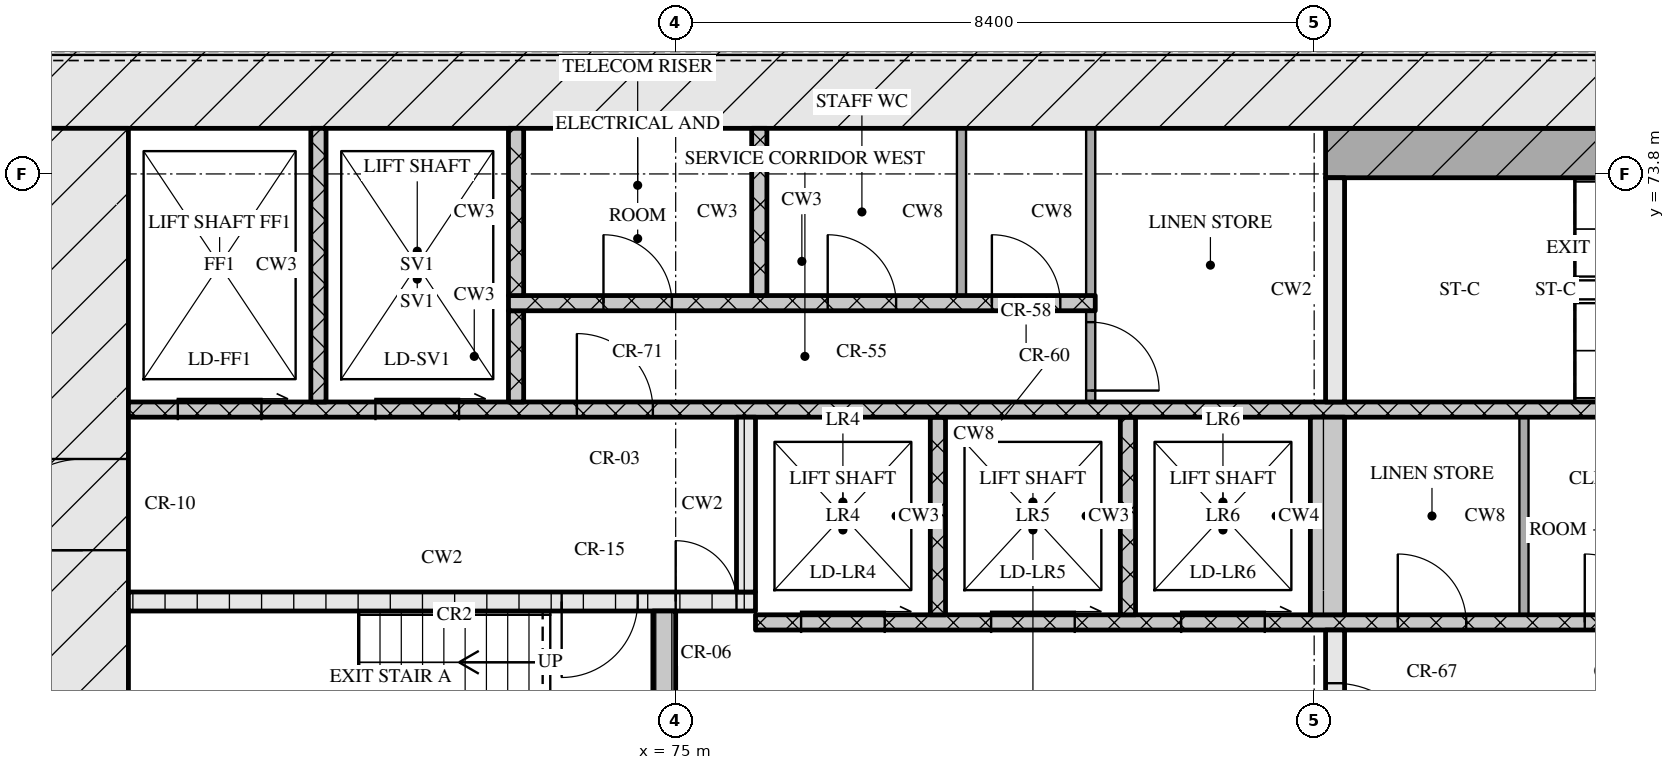
"""IFC4 building model, lengths in metres.
Left out: names, types, materials, properties, quantities, classifications, styles, units other than length and angle.
Written with IfcOpenShell. Run it as: python <this file> out.ifc"""

import sys

from ifc_helpers import new_model, si_unit, direction, frame, frame_2d, origin, place, context, subcontext, project, spatial, rectangle, extrude, element, fill, save


model = new_model("IFC4")
c1 = context("Model", 3, precision=1e-05, world=origin(), true_north=direction((0.0, 1.0)))
c2 = subcontext(c1, "Body", "Model", "MODEL_VIEW")
j1 = project(units=[si_unit("LENGTHUNIT", "METRE"), si_unit("PLANEANGLEUNIT", "RADIAN")], contexts=[c1])
p1 = place(None, origin())
s1 = spatial("IfcSite", under=j1, at=p1, CompositionType="ELEMENT")
p2 = place(p1, origin())
s2 = spatial("IfcBuilding", under=s1, at=p2, CompositionType="ELEMENT")
p3 = place(p2, frame((0.0, 0.0, 62.4)))
s3 = spatial("IfcBuildingStorey", under=s2, at=p3, CompositionType="ELEMENT", Elevation=62.4)
p4 = place(p3, frame((66.6, 75.0, 0.0), z_axis=(0.0, 0.0, 1.0), x_axis=(1.0, 0.0, 0.0)))
e1 = element("IfcWall", 1, at=p4, inside=s3, PredefinedType="SOLIDWALL", context=c2, shape_type="SweptSolid", body=[
    extrude(rectangle(XDim=42.0, YDim=1.2, at=frame_2d((21.0, 0.0))), origin(), (0.0, 0.0, 1.0), 3.32),
])
p5 = place(p3, frame((67.2, 62.4, 0.0), z_axis=(0.0, 0.0, 1.0), x_axis=(0.0, 1.0, 0.0)))
e2 = element("IfcWall", 2, at=p5, inside=s3, PredefinedType="SOLIDWALL", context=c2, shape_type="SweptSolid", body=[
    extrude(rectangle(XDim=12.0, YDim=1.2, at=frame_2d((6.0, 0.0))), origin(), (0.0, 0.0, 1.0), 3.32),
])
p6 = place(p5, frame((6.45, 0.0, 0.0)))
e3 = element("IfcOpeningElement", 3, at=p6, cuts=e2, PredefinedType="OPENING", context=c2, shape_type="SweptSolid", body=[
    extrude(rectangle(XDim=1.2, YDim=2.1, at=frame_2d((0.6, 1.05))), frame((0.0, 0.61, 0.0), z_axis=(0.0, -1.0, 0.0), x_axis=(1.0, 0.0, 0.0)), (0.0, 0.0, 1.0), 1.22),
])
p7 = place(p3, frame((74.85, 65.2, 0.0), z_axis=(0.0, 0.0, 1.0), x_axis=(0.0, 1.0, 0.0)))
e4 = element("IfcWall", 4, at=p7, inside=s3, PredefinedType="SOLIDWALL", context=c2, shape_type="SweptSolid", body=[
    extrude(rectangle(XDim=2.85, YDim=0.3, at=frame_2d((1.425, 0.0))), origin(), (0.0, 0.0, 1.0), 3.32),
])
p8 = place(p3, frame((83.675, 65.2, 0.0), z_axis=(0.0, 0.0, 1.0), x_axis=(0.0, 1.0, 0.0)))
e5 = element("IfcWall", 5, at=p8, inside=s3, PredefinedType="SOLIDWALL", context=c2, shape_type="SweptSolid", body=[
    extrude(rectangle(XDim=2.6, YDim=0.25, at=frame_2d((1.3, 0.0))), origin(), (0.0, 0.0, 1.0), 3.32),
])
p9 = place(p8, frame((0.7, 0.0, 0.0)))
e6 = element("IfcOpeningElement", 6, at=p9, cuts=e5, PredefinedType="OPENING", context=c2, shape_type="SweptSolid", body=[
    extrude(rectangle(XDim=1.2, YDim=2.1, at=frame_2d((0.6, 1.05))), frame((0.0, 0.135, 0.0), z_axis=(0.0, -1.0, 0.0), x_axis=(1.0, 0.0, 0.0)), (0.0, 0.0, 1.0), 0.27),
])
p10 = place(p3, frame((76.05, 67.9, 0.0), z_axis=(0.0, 0.0, 1.0), x_axis=(1.0, 0.0, 0.0)))
e7 = element("IfcWall", 7, at=p10, inside=s3, PredefinedType="SOLIDWALL", context=c2, shape_type="SweptSolid", body=[
    extrude(rectangle(XDim=23.1, YDim=0.2, at=frame_2d((11.55, 0.0))), origin(), (0.0, 0.0, 1.0), 3.32),
])
p11 = place(p10, frame((0.6, 0.0, 0.0)))
e8 = element("IfcOpeningElement", 8, at=p11, cuts=e7, PredefinedType="OPENING", context=c2, shape_type="SweptSolid", body=[
    extrude(rectangle(XDim=1.1, YDim=2.1, at=frame_2d((0.55, 1.05))), frame((0.0, 0.11, 0.0), z_axis=(0.0, -1.0, 0.0), x_axis=(1.0, 0.0, 0.0)), (0.0, 0.0, 1.0), 0.22),
])
p12 = place(p10, frame((3.1, 0.0, 0.0)))
e9 = element("IfcOpeningElement", 9, at=p12, cuts=e7, PredefinedType="OPENING", context=c2, shape_type="SweptSolid", body=[
    extrude(rectangle(XDim=1.1, YDim=2.1, at=frame_2d((0.55, 1.05))), frame((0.0, 0.11, 0.0), z_axis=(0.0, -1.0, 0.0), x_axis=(1.0, 0.0, 0.0)), (0.0, 0.0, 1.0), 0.22),
])
p13 = place(p10, frame((5.6, 0.0, 0.0)))
e10 = element("IfcOpeningElement", 10, at=p13, cuts=e7, PredefinedType="OPENING", context=c2, shape_type="SweptSolid", body=[
    extrude(rectangle(XDim=1.1, YDim=2.1, at=frame_2d((0.55, 1.05))), frame((0.0, 0.11, 0.0), z_axis=(0.0, -1.0, 0.0), x_axis=(1.0, 0.0, 0.0)), (0.0, 0.0, 1.0), 0.22),
])
p14 = place(p10, frame((8.45, 0.0, 0.0)))
e11 = element("IfcOpeningElement", 11, at=p14, cuts=e7, PredefinedType="OPENING", context=c2, shape_type="SweptSolid", body=[
    extrude(rectangle(XDim=0.9, YDim=2.1, at=frame_2d((0.45, 1.05))), frame((0.0, 0.11, 0.0), z_axis=(0.0, -1.0, 0.0), x_axis=(1.0, 0.0, 0.0)), (0.0, 0.0, 1.0), 0.22),
])
p15 = place(p10, frame((10.91, 0.0, 0.0)))
e12 = element("IfcOpeningElement", 12, at=p15, cuts=e7, PredefinedType="OPENING", context=c2, shape_type="SweptSolid", body=[
    extrude(rectangle(XDim=0.9, YDim=2.1, at=frame_2d((0.45, 1.05))), frame((0.0, 0.11, 0.0), z_axis=(0.0, -1.0, 0.0), x_axis=(1.0, 0.0, 0.0)), (0.0, 0.0, 1.0), 0.22),
])
p16 = place(p10, frame((13.55, 0.0, 0.0)))
e13 = element("IfcOpeningElement", 13, at=p16, cuts=e7, PredefinedType="OPENING", context=c2, shape_type="SweptSolid", body=[
    extrude(rectangle(XDim=1.0, YDim=2.1, at=frame_2d((0.5, 1.05))), frame((0.0, 0.11, 0.0), z_axis=(0.0, -1.0, 0.0), x_axis=(1.0, 0.0, 0.0)), (0.0, 0.0, 1.0), 0.22),
])
for number, where, z_axis, x_axis in (
    (14, (78.45, 68.0, 0.0), (0.0, 0.0, 1.0), (0.0, 1.0, 0.0)),
    (15, (80.95, 68.0, 0.0), (0.0, 0.0, 1.0), (0.0, 1.0, 0.0)),
):
    element("IfcWall", number, at=place(p3, frame(where, z_axis=z_axis, x_axis=x_axis)), inside=s3, PredefinedType="SOLIDWALL", context=c2, shape_type="SweptSolid", body=[
        extrude(rectangle(XDim=2.6, YDim=0.2, at=frame_2d((1.3, 0.0))), origin(), (0.0, 0.0, 1.0), 3.32),
    ])
p17 = place(p3, frame((83.575, 68.0, 0.0), z_axis=(0.0, 0.0, 1.0), x_axis=(0.0, 1.0, 0.0)))
e16 = element("IfcWall", 16, at=p17, inside=s3, PredefinedType="SOLIDWALL", context=c2, shape_type="SweptSolid", body=[
    extrude(rectangle(XDim=2.6, YDim=0.45, at=frame_2d((1.3, 0.0))), origin(), (0.0, 0.0, 1.0), 3.32),
])
p18 = place(p3, frame((86.16, 68.0, 0.0), z_axis=(0.0, 0.0, 1.0), x_axis=(0.0, 1.0, 0.0)))
e17 = element("IfcWall", 17, at=p18, inside=s3, PredefinedType="PARTITIONING", context=c2, shape_type="SweptSolid", body=[
    extrude(rectangle(XDim=2.6, YDim=0.12, at=frame_2d((1.3, 0.0))), origin(), (0.0, 0.0, 1.0), 3.32),
])
p19 = place(p3, frame((67.8, 68.175, 0.0), z_axis=(0.0, 0.0, 1.0), x_axis=(1.0, 0.0, 0.0)))
e18 = element("IfcWall", 18, at=p19, inside=s3, PredefinedType="SOLIDWALL", context=c2, shape_type="SweptSolid", body=[
    extrude(rectangle(XDim=8.25, YDim=0.25, at=frame_2d((4.125, 0.0))), origin(), (0.0, 0.0, 1.0), 3.32),
])
p20 = place(p19, frame((5.7, 0.0, 0.0)))
e19 = element("IfcOpeningElement", 19, at=p20, cuts=e18, PredefinedType="OPENING", context=c2, shape_type="SweptSolid", body=[
    extrude(rectangle(XDim=1.0, YDim=2.1, at=frame_2d((0.5, 1.05))), frame((0.0, 0.135, 0.0), z_axis=(0.0, -1.0, 0.0), x_axis=(1.0, 0.0, 0.0)), (0.0, 0.0, 1.0), 0.27),
])
p21 = place(p19, frame((7.2, 0.0, 0.0)))
e20 = element("IfcOpeningElement", 20, at=p21, cuts=e18, PredefinedType="OPENING", context=c2, shape_type="SweptSolid", body=[
    extrude(rectangle(XDim=0.8, YDim=2.1, at=frame_2d((0.4, 1.05))), frame((0.0, 0.135, 0.0), z_axis=(0.0, -1.0, 0.0), x_axis=(1.0, 0.0, 0.0)), (0.0, 0.0, 1.0), 0.27),
])
p22 = place(p3, frame((75.925, 68.3, 0.0), z_axis=(0.0, 0.0, 1.0), x_axis=(0.0, 1.0, 0.0)))
e21 = element("IfcWall", 21, at=p22, inside=s3, PredefinedType="SOLIDWALL", context=c2, shape_type="SweptSolid", body=[
    extrude(rectangle(XDim=2.3, YDim=0.25, at=frame_2d((1.15, 0.0))), origin(), (0.0, 0.0, 1.0), 3.32),
])
p23 = place(p3, frame((67.8, 70.7, 0.0), z_axis=(0.0, 0.0, 1.0), x_axis=(1.0, 0.0, 0.0)))
e22 = element("IfcWall", 22, at=p23, inside=s3, PredefinedType="SOLIDWALL", context=c2, shape_type="SweptSolid", body=[
    extrude(rectangle(XDim=39.6, YDim=0.2, at=frame_2d((19.8, 0.0))), origin(), (0.0, 0.0, 1.0), 3.32),
])
p24 = place(p23, frame((0.65, 0.0, 0.0)))
e23 = element("IfcOpeningElement", 23, at=p24, cuts=e22, PredefinedType="OPENING", context=c2, shape_type="SweptSolid", body=[
    extrude(rectangle(XDim=1.1, YDim=2.1, at=frame_2d((0.55, 1.05))), frame((0.0, 0.11, 0.0), z_axis=(0.0, -1.0, 0.0), x_axis=(1.0, 0.0, 0.0)), (0.0, 0.0, 1.0), 0.22),
])
p25 = place(p23, frame((3.25, 0.0, 0.0)))
e24 = element("IfcOpeningElement", 24, at=p25, cuts=e22, PredefinedType="OPENING", context=c2, shape_type="SweptSolid", body=[
    extrude(rectangle(XDim=1.1, YDim=2.1, at=frame_2d((0.55, 1.05))), frame((0.0, 0.11, 0.0), z_axis=(0.0, -1.0, 0.0), x_axis=(1.0, 0.0, 0.0)), (0.0, 0.0, 1.0), 0.22),
])
p26 = place(p23, frame((5.9, 0.0, 0.0)))
e25 = element("IfcOpeningElement", 25, at=p26, cuts=e22, PredefinedType="OPENING", context=c2, shape_type="SweptSolid", body=[
    extrude(rectangle(XDim=1.0, YDim=2.1, at=frame_2d((0.5, 1.05))), frame((0.0, 0.11, 0.0), z_axis=(0.0, -1.0, 0.0), x_axis=(1.0, 0.0, 0.0)), (0.0, 0.0, 1.0), 0.22),
])
p27 = place(p23, frame((21.7, 0.0, 0.0)))
e26 = element("IfcOpeningElement", 26, at=p27, cuts=e22, PredefinedType="OPENING", context=c2, shape_type="SweptSolid", body=[
    extrude(rectangle(XDim=1.0, YDim=2.1, at=frame_2d((0.5, 1.05))), frame((0.0, 0.11, 0.0), z_axis=(0.0, -1.0, 0.0), x_axis=(1.0, 0.0, 0.0)), (0.0, 0.0, 1.0), 0.22),
])
p28 = place(p23, frame((32.7, 0.0, 0.0)))
e27 = element("IfcOpeningElement", 27, at=p28, cuts=e22, PredefinedType="OPENING", context=c2, shape_type="SweptSolid", body=[
    extrude(rectangle(XDim=1.0, YDim=2.1, at=frame_2d((0.5, 1.05))), frame((0.0, 0.11, 0.0), z_axis=(0.0, -1.0, 0.0), x_axis=(1.0, 0.0, 0.0)), (0.0, 0.0, 1.0), 0.22),
])
p29 = place(p23, frame((35.25, 0.0, 0.0)))
e28 = element("IfcOpeningElement", 28, at=p29, cuts=e22, PredefinedType="OPENING", context=c2, shape_type="SweptSolid", body=[
    extrude(rectangle(XDim=1.1, YDim=2.1, at=frame_2d((0.55, 1.05))), frame((0.0, 0.11, 0.0), z_axis=(0.0, -1.0, 0.0), x_axis=(1.0, 0.0, 0.0)), (0.0, 0.0, 1.0), 0.22),
])
p30 = place(p23, frame((37.85, 0.0, 0.0)))
e29 = element("IfcOpeningElement", 29, at=p30, cuts=e22, PredefinedType="OPENING", context=c2, shape_type="SweptSolid", body=[
    extrude(rectangle(XDim=1.1, YDim=2.1, at=frame_2d((0.55, 1.05))), frame((0.0, 0.11, 0.0), z_axis=(0.0, -1.0, 0.0), x_axis=(1.0, 0.0, 0.0)), (0.0, 0.0, 1.0), 0.22),
])
p31 = place(p3, frame((70.3, 70.8, 0.0), z_axis=(0.0, 0.0, 1.0), x_axis=(0.0, 1.0, 0.0)))
e30 = element("IfcWall", 30, at=p31, inside=s3, PredefinedType="SOLIDWALL", context=c2, shape_type="SweptSolid", body=[
    extrude(rectangle(XDim=3.6, YDim=0.2, at=frame_2d((1.8, 0.0))), origin(), (0.0, 0.0, 1.0), 3.32),
])
p32 = place(p3, frame((72.9, 70.8, 0.0), z_axis=(0.0, 0.0, 1.0), x_axis=(0.0, 1.0, 0.0)))
e31 = element("IfcWall", 31, at=p32, inside=s3, PredefinedType="SOLIDWALL", context=c2, shape_type="SweptSolid", body=[
    extrude(rectangle(XDim=1.2, YDim=0.2, at=frame_2d((0.6, 0.0))), origin(), (0.0, 0.0, 1.0), 3.32),
])
p33 = place(p3, frame((80.46, 70.8, 0.0), z_axis=(0.0, 0.0, 1.0), x_axis=(0.0, 1.0, 0.0)))
e32 = element("IfcWall", 32, at=p33, inside=s3, PredefinedType="PARTITIONING", context=c2, shape_type="SweptSolid", body=[
    extrude(rectangle(XDim=1.2, YDim=0.12, at=frame_2d((0.6, 0.0))), origin(), (0.0, 0.0, 1.0), 3.32),
])
p34 = place(p33, frame((0.15, 0.0, 0.0)))
e33 = element("IfcOpeningElement", 33, at=p34, cuts=e32, PredefinedType="OPENING", context=c2, shape_type="SweptSolid", body=[
    extrude(rectangle(XDim=0.9, YDim=2.1, at=frame_2d((0.45, 1.05))), frame((0.0, 0.07, 0.0), z_axis=(0.0, -1.0, 0.0), x_axis=(1.0, 0.0, 0.0)), (0.0, 0.0, 1.0), 0.14),
])
p35 = place(p3, frame((83.675, 70.8, 0.0), z_axis=(0.0, 0.0, 1.0), x_axis=(0.0, 1.0, 0.0)))
e34 = element("IfcWall", 34, at=p35, inside=s3, PredefinedType="SOLIDWALL", context=c2, shape_type="SweptSolid", body=[
    extrude(rectangle(XDim=2.95, YDim=0.25, at=frame_2d((1.475, 0.0))), origin(), (0.0, 0.0, 1.0), 3.32),
])
p36 = place(p3, frame((72.8, 72.1, 0.0), z_axis=(0.0, 0.0, 1.0), x_axis=(1.0, 0.0, 0.0)))
e35 = element("IfcWall", 35, at=p36, inside=s3, PredefinedType="SOLIDWALL", context=c2, shape_type="SweptSolid", body=[
    extrude(rectangle(XDim=7.72, YDim=0.2, at=frame_2d((3.86, 0.0))), origin(), (0.0, 0.0, 1.0), 3.32),
])
p37 = place(p36, frame((1.25, 0.0, 0.0)))
e36 = element("IfcOpeningElement", 36, at=p37, cuts=e35, PredefinedType="OPENING", context=c2, shape_type="SweptSolid", body=[
    extrude(rectangle(XDim=0.9, YDim=2.1, at=frame_2d((0.45, 1.05))), frame((0.0, 0.11, 0.0), z_axis=(0.0, -1.0, 0.0), x_axis=(1.0, 0.0, 0.0)), (0.0, 0.0, 1.0), 0.22),
])
p38 = place(p36, frame((4.2, 0.0, 0.0)))
e37 = element("IfcOpeningElement", 37, at=p38, cuts=e35, PredefinedType="OPENING", context=c2, shape_type="SweptSolid", body=[
    extrude(rectangle(XDim=0.9, YDim=2.1, at=frame_2d((0.45, 1.05))), frame((0.0, 0.11, 0.0), z_axis=(0.0, -1.0, 0.0), x_axis=(1.0, 0.0, 0.0)), (0.0, 0.0, 1.0), 0.22),
])
p39 = place(p36, frame((6.36, 0.0, 0.0)))
e38 = element("IfcOpeningElement", 38, at=p39, cuts=e35, PredefinedType="OPENING", context=c2, shape_type="SweptSolid", body=[
    extrude(rectangle(XDim=0.9, YDim=2.1, at=frame_2d((0.45, 1.05))), frame((0.0, 0.11, 0.0), z_axis=(0.0, -1.0, 0.0), x_axis=(1.0, 0.0, 0.0)), (0.0, 0.0, 1.0), 0.22),
])
for number, where, z_axis, x_axis in (
    (39, (72.9, 72.2, 0.0), (0.0, 0.0, 1.0), (0.0, 1.0, 0.0)),
    (40, (76.1, 72.2, 0.0), (0.0, 0.0, 1.0), (0.0, 1.0, 0.0)),
):
    element("IfcWall", number, at=place(p3, frame(where, z_axis=z_axis, x_axis=x_axis)), inside=s3, PredefinedType="SOLIDWALL", context=c2, shape_type="SweptSolid", body=[
        extrude(rectangle(XDim=2.2, YDim=0.2, at=frame_2d((1.1, 0.0))), origin(), (0.0, 0.0, 1.0), 3.32),
    ])
for number, where, z_axis, x_axis in (
    (41, (78.76, 72.2, 0.0), (0.0, 0.0, 1.0), (0.0, 1.0, 0.0)),
    (42, (80.46, 72.2, 0.0), (0.0, 0.0, 1.0), (0.0, 1.0, 0.0)),
):
    element("IfcWall", number, at=place(p3, frame(where, z_axis=z_axis, x_axis=x_axis)), inside=s3, PredefinedType="PARTITIONING", context=c2, shape_type="SweptSolid", body=[
        extrude(rectangle(XDim=2.2, YDim=0.12, at=frame_2d((1.1, 0.0))), origin(), (0.0, 0.0, 1.0), 3.32),
    ])
p40 = place(p3, frame((83.55, 74.075, 0.0), z_axis=(0.0, 0.0, 1.0), x_axis=(1.0, 0.0, 0.0)))
e43 = element("IfcWall", 43, at=p40, inside=s3, PredefinedType="SOLIDWALL", context=c2, shape_type="SweptSolid", body=[
    extrude(rectangle(XDim=8.1, YDim=0.65, at=frame_2d((4.05, 0.0))), origin(), (0.0, 0.0, 1.0), 3.32),
])
p41 = place(p9, origin())
e44 = element("IfcDoor", 44, at=p41, inside=s3, OperationType="SINGLE_SWING_RIGHT", PredefinedType="DOOR", context=c2, shape_type="SweptSolid", body=[
    extrude(rectangle(XDim=1.2, YDim=2.1, at=frame_2d((0.6, 1.05))), frame((0.0, 0.025, 0.0), z_axis=(0.0, -1.0, 0.0), x_axis=(1.0, 0.0, 0.0)), (0.0, 0.0, 1.0), 0.05),
])
fill(e6, e44)
p42 = place(p11, origin())
e45 = element("IfcDoor", 45, at=p42, inside=s3, OperationType="SLIDING_TO_RIGHT", PredefinedType="DOOR", context=c2, shape_type="SweptSolid", body=[
    extrude(rectangle(XDim=1.1, YDim=2.1, at=frame_2d((0.55, 1.05))), frame((0.0, 0.025, 0.0), z_axis=(0.0, -1.0, 0.0), x_axis=(1.0, 0.0, 0.0)), (0.0, 0.0, 1.0), 0.05),
])
fill(e8, e45)
p43 = place(p12, origin())
e46 = element("IfcDoor", 46, at=p43, inside=s3, OperationType="SLIDING_TO_RIGHT", PredefinedType="DOOR", context=c2, shape_type="SweptSolid", body=[
    extrude(rectangle(XDim=1.1, YDim=2.1, at=frame_2d((0.55, 1.05))), frame((0.0, 0.025, 0.0), z_axis=(0.0, -1.0, 0.0), x_axis=(1.0, 0.0, 0.0)), (0.0, 0.0, 1.0), 0.05),
])
fill(e9, e46)
p44 = place(p13, origin())
e47 = element("IfcDoor", 47, at=p44, inside=s3, OperationType="SLIDING_TO_RIGHT", PredefinedType="DOOR", context=c2, shape_type="SweptSolid", body=[
    extrude(rectangle(XDim=1.1, YDim=2.1, at=frame_2d((0.55, 1.05))), frame((0.0, 0.025, 0.0), z_axis=(0.0, -1.0, 0.0), x_axis=(1.0, 0.0, 0.0)), (0.0, 0.0, 1.0), 0.05),
])
fill(e10, e47)
p45 = place(p14, origin())
e48 = element("IfcDoor", 48, at=p45, inside=s3, OperationType="SINGLE_SWING_LEFT", PredefinedType="DOOR", context=c2, shape_type="SweptSolid", body=[
    extrude(rectangle(XDim=0.9, YDim=2.1, at=frame_2d((0.45, 1.05))), frame((0.0, 0.025, 0.0), z_axis=(0.0, -1.0, 0.0), x_axis=(1.0, 0.0, 0.0)), (0.0, 0.0, 1.0), 0.05),
])
fill(e11, e48)
p46 = place(p15, origin())
e49 = element("IfcDoor", 49, at=p46, inside=s3, OperationType="SINGLE_SWING_LEFT", PredefinedType="DOOR", context=c2, shape_type="SweptSolid", body=[
    extrude(rectangle(XDim=0.9, YDim=2.1, at=frame_2d((0.45, 1.05))), frame((0.0, 0.025, 0.0), z_axis=(0.0, -1.0, 0.0), x_axis=(1.0, 0.0, 0.0)), (0.0, 0.0, 1.0), 0.05),
])
fill(e12, e49)
p47 = place(p20, origin())
e50 = element("IfcDoor", 50, at=p47, inside=s3, OperationType="SINGLE_SWING_RIGHT", PredefinedType="DOOR", context=c2, shape_type="SweptSolid", body=[
    extrude(rectangle(XDim=1.0, YDim=2.1, at=frame_2d((0.5, 1.05))), frame((0.0, 0.025, 0.0), z_axis=(0.0, -1.0, 0.0), x_axis=(1.0, 0.0, 0.0)), (0.0, 0.0, 1.0), 0.05),
])
fill(e19, e50)
p48 = place(p21, origin())
e51 = element("IfcDoor", 51, at=p48, inside=s3, OperationType="SINGLE_SWING_LEFT", PredefinedType="DOOR", context=c2, shape_type="SweptSolid", body=[
    extrude(rectangle(XDim=0.8, YDim=2.1, at=frame_2d((0.4, 1.05))), frame((0.0, 0.025, 0.0), z_axis=(0.0, -1.0, 0.0), x_axis=(1.0, 0.0, 0.0)), (0.0, 0.0, 1.0), 0.05),
])
fill(e20, e51)
p49 = place(p6, origin())
e52 = element("IfcDoor", 52, at=p49, inside=s3, OperationType="SINGLE_SWING_LEFT", PredefinedType="DOOR", context=c2, shape_type="SweptSolid", body=[
    extrude(rectangle(XDim=1.2, YDim=2.1, at=frame_2d((0.6, 1.05))), frame((0.0, 0.025, 0.0), z_axis=(0.0, -1.0, 0.0), x_axis=(1.0, 0.0, 0.0)), (0.0, 0.0, 1.0), 0.05),
])
fill(e3, e52)
p50 = place(p24, origin())
e53 = element("IfcDoor", 53, at=p50, inside=s3, OperationType="SLIDING_TO_RIGHT", PredefinedType="DOOR", context=c2, shape_type="SweptSolid", body=[
    extrude(rectangle(XDim=1.1, YDim=2.1, at=frame_2d((0.55, 1.05))), frame((0.0, 0.025, 0.0), z_axis=(0.0, -1.0, 0.0), x_axis=(1.0, 0.0, 0.0)), (0.0, 0.0, 1.0), 0.05),
])
fill(e23, e53)
p51 = place(p25, origin())
e54 = element("IfcDoor", 54, at=p51, inside=s3, OperationType="SLIDING_TO_RIGHT", PredefinedType="DOOR", context=c2, shape_type="SweptSolid", body=[
    extrude(rectangle(XDim=1.1, YDim=2.1, at=frame_2d((0.55, 1.05))), frame((0.0, 0.025, 0.0), z_axis=(0.0, -1.0, 0.0), x_axis=(1.0, 0.0, 0.0)), (0.0, 0.0, 1.0), 0.05),
])
fill(e24, e54)
p52 = place(p26, origin())
e55 = element("IfcDoor", 55, at=p52, inside=s3, OperationType="SINGLE_SWING_LEFT", PredefinedType="DOOR", context=c2, shape_type="SweptSolid", body=[
    extrude(rectangle(XDim=1.0, YDim=2.1, at=frame_2d((0.5, 1.05))), frame((0.0, 0.025, 0.0), z_axis=(0.0, -1.0, 0.0), x_axis=(1.0, 0.0, 0.0)), (0.0, 0.0, 1.0), 0.05),
])
fill(e25, e55)
p53 = place(p34, origin())
e56 = element("IfcDoor", 56, at=p53, inside=s3, OperationType="SINGLE_SWING_RIGHT", PredefinedType="DOOR", context=c2, shape_type="SweptSolid", body=[
    extrude(rectangle(XDim=0.9, YDim=2.1, at=frame_2d((0.45, 1.05))), frame((0.0, 0.025, 0.0), z_axis=(0.0, -1.0, 0.0), x_axis=(1.0, 0.0, 0.0)), (0.0, 0.0, 1.0), 0.05),
])
fill(e33, e56)
p54 = place(p37, origin())
e57 = element("IfcDoor", 57, at=p54, inside=s3, OperationType="SINGLE_SWING_LEFT", PredefinedType="DOOR", context=c2, shape_type="SweptSolid", body=[
    extrude(rectangle(XDim=0.9, YDim=2.1, at=frame_2d((0.45, 1.05))), frame((0.0, 0.025, 0.0), z_axis=(0.0, -1.0, 0.0), x_axis=(1.0, 0.0, 0.0)), (0.0, 0.0, 1.0), 0.05),
])
fill(e36, e57)
p55 = place(p38, origin())
e58 = element("IfcDoor", 58, at=p55, inside=s3, OperationType="SINGLE_SWING_LEFT", PredefinedType="DOOR", context=c2, shape_type="SweptSolid", body=[
    extrude(rectangle(XDim=0.9, YDim=2.1, at=frame_2d((0.45, 1.05))), frame((0.0, 0.025, 0.0), z_axis=(0.0, -1.0, 0.0), x_axis=(1.0, 0.0, 0.0)), (0.0, 0.0, 1.0), 0.05),
])
fill(e37, e58)
p56 = place(p39, origin())
e59 = element("IfcDoor", 59, at=p56, inside=s3, OperationType="SINGLE_SWING_LEFT", PredefinedType="DOOR", context=c2, shape_type="SweptSolid", body=[
    extrude(rectangle(XDim=0.9, YDim=2.1, at=frame_2d((0.45, 1.05))), frame((0.0, 0.025, 0.0), z_axis=(0.0, -1.0, 0.0), x_axis=(1.0, 0.0, 0.0)), (0.0, 0.0, 1.0), 0.05),
])
fill(e38, e59)
save(model, sys.argv[1])
